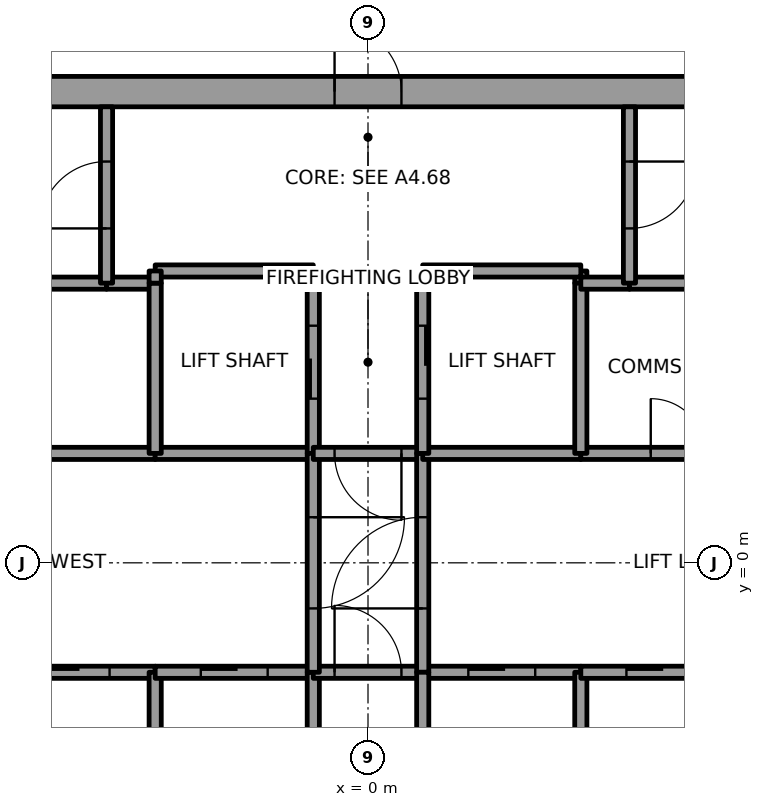
"""IFC4 building model, lengths in metres.
Left out: names, types, materials, properties, quantities, classifications, styles, units other than length and angle.
Written with IfcOpenShell. Run it as: python <this file> out.ifc"""

import sys

from ifc_helpers import new_model, si_unit, direction, frame, frame_2d, origin, place, context, subcontext, project, spatial, rectangle, extrude, element, fill, save


model = new_model("IFC4")
c1 = context("Model", 3, precision=1e-05, world=origin(), true_north=direction((0.0, 1.0)))
c2 = subcontext(c1, "Body", "Model", "MODEL_VIEW")
j1 = project(units=[si_unit("LENGTHUNIT", "METRE"), si_unit("PLANEANGLEUNIT", "RADIAN")], contexts=[c1])
p1 = place(None, origin())
s1 = spatial("IfcSite", under=j1, at=p1, CompositionType="ELEMENT")
p2 = place(p1, origin())
s2 = spatial("IfcBuilding", under=s1, at=p2, CompositionType="ELEMENT")
p3 = place(p2, frame((0.0, 0.0, 291.0)))
s3 = spatial("IfcBuildingStorey", under=s2, at=p3, CompositionType="ELEMENT", Elevation=291.0)
p4 = place(p3, frame((-11.0, 7.75, 0.0), z_axis=(0.0, 0.0, 1.0), x_axis=(1.0, 0.0, 0.0)))
e1 = element("IfcWall", 1, at=p4, inside=s3, PredefinedType="SHEAR", context=c2, shape_type="SweptSolid", body=[
    extrude(rectangle(XDim=22.0, YDim=0.5, at=frame_2d((11.0, 0.0))), origin(), (0.0, 0.0, 1.0), 4.0),
])
p5 = place(p4, frame((10.45, 0.0, 0.0)))
e2 = element("IfcOpeningElement", 2, at=p5, cuts=e1, PredefinedType="OPENING", context=c2, shape_type="SweptSolid", body=[
    extrude(rectangle(XDim=1.1, YDim=2.1, at=frame_2d((0.55, 1.05))), frame((0.0, 0.25, 0.0), z_axis=(0.0, -1.0, 0.0), x_axis=(1.0, 0.0, 0.0)), (0.0, 0.0, 1.0), 0.5),
])
p6 = place(p3, frame((-8.7, 1.8, 0.0), z_axis=(0.0, 0.0, 1.0), x_axis=(1.0, 0.0, 0.0)))
e3 = element("IfcWall", 3, at=p6, inside=s3, PredefinedType="SOLIDWALL", context=c2, shape_type="SweptSolid", body=[
    extrude(rectangle(XDim=5.2, YDim=0.2, at=frame_2d((2.6, 0.0))), origin(), (0.0, 0.0, 1.0), 3.85),
])
p7 = place(p6, frame((2.15, 0.0, 0.0)))
e4 = element("IfcOpeningElement", 4, at=p7, cuts=e3, PredefinedType="OPENING", context=c2, shape_type="SweptSolid", body=[
    extrude(rectangle(XDim=0.9, YDim=2.1, at=frame_2d((0.45, 1.05))), frame((0.0, 0.1, 0.0), z_axis=(0.0, -1.0, 0.0), x_axis=(1.0, 0.0, 0.0)), (0.0, 0.0, 1.0), 0.2),
])
p8 = place(p3, frame((-4.3, 4.6, 0.0), z_axis=(0.0, 0.0, 1.0), x_axis=(-1.0, 0.0, 0.0)))
e5 = element("IfcWall", 5, at=p8, inside=s3, PredefinedType="SOLIDWALL", context=c2, shape_type="SweptSolid", body=[
    extrude(rectangle(XDim=4.4, YDim=0.2, at=frame_2d((2.2, 0.0))), origin(), (0.0, 0.0, 1.0), 3.85),
])
p9 = place(p3, frame((-6.1, -1.8, 0.0), z_axis=(0.0, 0.0, 1.0), x_axis=(1.0, 0.0, 0.0)))
e6 = element("IfcWall", 6, at=p9, inside=s3, PredefinedType="SOLIDWALL", context=c2, shape_type="SweptSolid", body=[
    extrude(rectangle(XDim=2.6, YDim=0.2, at=frame_2d((1.3, 0.0))), origin(), (0.0, 0.0, 1.0), 3.85),
])
p10 = place(p9, frame((0.75, 0.0, 0.0)))
e7 = element("IfcOpeningElement", 7, at=p10, cuts=e6, PredefinedType="OPENING", context=c2, shape_type="SweptSolid", body=[
    extrude(rectangle(XDim=1.1, YDim=2.1, at=frame_2d((0.55, 1.05))), frame((0.0, 0.1, 0.0), z_axis=(0.0, -1.0, 0.0), x_axis=(1.0, 0.0, 0.0)), (0.0, 0.0, 1.0), 0.2),
])
p11 = place(p3, frame((-3.5, 4.6, 0.0), z_axis=(0.0, 0.0, 1.0), x_axis=(-1.0, 0.0, 0.0)))
e8 = element("IfcWall", 8, at=p11, inside=s3, PredefinedType="SOLIDWALL", context=c2, shape_type="SweptSolid", body=[
    extrude(rectangle(XDim=0.8, YDim=0.2, at=frame_2d((0.4, 0.0))), origin(), (0.0, 0.0, 1.0), 3.85),
])
p12 = place(p3, frame((-4.3, 4.6, 0.0), z_axis=(0.0, 0.0, 1.0), x_axis=(0.0, 1.0, 0.0)))
e9 = element("IfcWall", 9, at=p12, inside=s3, PredefinedType="SOLIDWALL", context=c2, shape_type="SweptSolid", body=[
    extrude(rectangle(XDim=2.9, YDim=0.2, at=frame_2d((1.45, 0.0))), origin(), (0.0, 0.0, 1.0), 3.85),
])
p13 = place(p12, frame((0.9, 0.0, 0.0)))
e10 = element("IfcOpeningElement", 10, at=p13, cuts=e9, PredefinedType="OPENING", context=c2, shape_type="SweptSolid", body=[
    extrude(rectangle(XDim=1.1, YDim=2.1, at=frame_2d((0.55, 1.05))), frame((0.0, 0.1, 0.0), z_axis=(0.0, -1.0, 0.0), x_axis=(1.0, 0.0, 0.0)), (0.0, 0.0, 1.0), 0.2),
])
p14 = place(p3, frame((-3.5, -4.6, 0.0), z_axis=(0.0, 0.0, 1.0), x_axis=(0.0, 1.0, 0.0)))
e11 = element("IfcWall", 11, at=p14, inside=s3, PredefinedType="SOLIDWALL", context=c2, shape_type="SweptSolid", body=[
    extrude(rectangle(XDim=2.8, YDim=0.2, at=frame_2d((1.4, 0.0))), origin(), (0.0, 0.0, 1.0), 3.85),
])
p15 = place(p3, frame((-3.5, -1.8, 0.0), z_axis=(0.0, 0.0, 1.0), x_axis=(1.0, 0.0, 0.0)))
e12 = element("IfcWall", 12, at=p15, inside=s3, PredefinedType="SOLIDWALL", context=c2, shape_type="SweptSolid", body=[
    extrude(rectangle(XDim=2.6, YDim=0.2, at=frame_2d((1.3, 0.0))), origin(), (0.0, 0.0, 1.0), 3.85),
])
p16 = place(p15, frame((0.75, 0.0, 0.0)))
e13 = element("IfcOpeningElement", 13, at=p16, cuts=e12, PredefinedType="OPENING", context=c2, shape_type="SweptSolid", body=[
    extrude(rectangle(XDim=1.1, YDim=2.1, at=frame_2d((0.55, 1.05))), frame((0.0, 0.1, 0.0), z_axis=(0.0, -1.0, 0.0), x_axis=(1.0, 0.0, 0.0)), (0.0, 0.0, 1.0), 0.2),
])
p17 = place(p3, frame((-0.9, 1.8, 0.0), z_axis=(0.0, 0.0, 1.0), x_axis=(-1.0, 0.0, 0.0)))
e14 = element("IfcWall", 14, at=p17, inside=s3, PredefinedType="SOLIDWALL", context=c2, shape_type="SweptSolid", body=[
    extrude(rectangle(XDim=2.6, YDim=0.2, at=frame_2d((1.3, 0.0))), origin(), (0.0, 0.0, 1.0), 3.85),
])
p18 = place(p3, frame((-3.5, 1.8, 0.0), z_axis=(0.0, 0.0, 1.0), x_axis=(0.0, 1.0, 0.0)))
e15 = element("IfcWall", 15, at=p18, inside=s3, PredefinedType="SOLIDWALL", context=c2, shape_type="SweptSolid", body=[
    extrude(rectangle(XDim=2.8, YDim=0.2, at=frame_2d((1.4, 0.0))), origin(), (0.0, 0.0, 1.0), 3.85),
])
p19 = place(p3, frame((-0.9, 1.8, 0.0), z_axis=(0.0, 0.0, 1.0), x_axis=(0.0, 1.0, 0.0)))
e16 = element("IfcWall", 16, at=p19, inside=s3, PredefinedType="SOLIDWALL", context=c2, shape_type="SweptSolid", body=[
    extrude(rectangle(XDim=3.0, YDim=0.2, at=frame_2d((1.5, 0.0))), origin(), (0.0, 0.0, 1.0), 3.85),
])
p20 = place(p19, frame((0.9, 0.0, 0.0)))
e17 = element("IfcOpeningElement", 17, at=p20, cuts=e16, PredefinedType="OPENING", context=c2, shape_type="SweptSolid", body=[
    extrude(rectangle(XDim=1.2, YDim=2.1, at=frame_2d((0.6, 1.05))), frame((0.0, 0.1, 0.0), z_axis=(0.0, -1.0, 0.0), x_axis=(1.0, 0.0, 0.0)), (0.0, 0.0, 1.0), 0.2),
])
p21 = place(p3, frame((-0.9, 4.8, 0.0), z_axis=(0.0, 0.0, 1.0), x_axis=(-1.0, 0.0, 0.0)))
e18 = element("IfcWall", 18, at=p21, inside=s3, PredefinedType="SOLIDWALL", context=c2, shape_type="SweptSolid", body=[
    extrude(rectangle(XDim=2.6, YDim=0.2, at=frame_2d((1.3, 0.0))), origin(), (0.0, 0.0, 1.0), 3.85),
])
p22 = place(p3, frame((-3.5, 4.8, 0.0), z_axis=(0.0, 0.0, 1.0), x_axis=(0.0, -1.0, 0.0)))
e19 = element("IfcWall", 19, at=p22, inside=s3, PredefinedType="SOLIDWALL", context=c2, shape_type="SweptSolid", body=[
    extrude(rectangle(XDim=0.2, YDim=0.2, at=frame_2d((0.1, 0.0))), origin(), (0.0, 0.0, 1.0), 3.85),
])
p23 = place(p3, frame((-0.9, -4.6, 0.0), z_axis=(0.0, 0.0, 1.0), x_axis=(0.0, 1.0, 0.0)))
e20 = element("IfcWall", 20, at=p23, inside=s3, PredefinedType="SOLIDWALL", context=c2, shape_type="SweptSolid", body=[
    extrude(rectangle(XDim=2.8, YDim=0.2, at=frame_2d((1.4, 0.0))), origin(), (0.0, 0.0, 1.0), 3.85),
])
p24 = place(p3, frame((-0.9, -1.8, 0.0), z_axis=(0.0, 0.0, 1.0), x_axis=(1.0, 0.0, 0.0)))
e21 = element("IfcWall", 21, at=p24, inside=s3, PredefinedType="SOLIDWALL", context=c2, shape_type="SweptSolid", body=[
    extrude(rectangle(XDim=1.8, YDim=0.2, at=frame_2d((0.9, 0.0))), origin(), (0.0, 0.0, 1.0), 3.85),
])
p25 = place(p24, frame((0.35, 0.0, 0.0)))
e22 = element("IfcOpeningElement", 22, at=p25, cuts=e21, PredefinedType="OPENING", context=c2, shape_type="SweptSolid", body=[
    extrude(rectangle(XDim=1.1, YDim=2.1, at=frame_2d((0.55, 1.05))), frame((0.0, 0.1, 0.0), z_axis=(0.0, -1.0, 0.0), x_axis=(1.0, 0.0, 0.0)), (0.0, 0.0, 1.0), 0.2),
])
p26 = place(p3, frame((-0.9, 1.8, 0.0), z_axis=(0.0, 0.0, 1.0), x_axis=(0.0, -1.0, 0.0)))
e23 = element("IfcWall", 23, at=p26, inside=s3, PredefinedType="SOLIDWALL", context=c2, shape_type="SweptSolid", body=[
    extrude(rectangle(XDim=3.6, YDim=0.2, at=frame_2d((1.8, 0.0))), origin(), (0.0, 0.0, 1.0), 3.85),
])
p27 = place(p26, frame((1.05, 0.0, 0.0)))
e24 = element("IfcOpeningElement", 24, at=p27, cuts=e23, PredefinedType="OPENING", context=c2, shape_type="SweptSolid", body=[
    extrude(rectangle(XDim=1.5, YDim=2.1, at=frame_2d((0.75, 1.05))), frame((0.0, 0.1, 0.0), z_axis=(0.0, -1.0, 0.0), x_axis=(1.0, 0.0, 0.0)), (0.0, 0.0, 1.0), 0.2),
])
p28 = place(p3, frame((0.9, 1.8, 0.0), z_axis=(0.0, 0.0, 1.0), x_axis=(-1.0, 0.0, 0.0)))
e25 = element("IfcWall", 25, at=p28, inside=s3, PredefinedType="SOLIDWALL", context=c2, shape_type="SweptSolid", body=[
    extrude(rectangle(XDim=1.8, YDim=0.2, at=frame_2d((0.9, 0.0))), origin(), (0.0, 0.0, 1.0), 3.85),
])
p29 = place(p28, frame((0.35, 0.0, 0.0)))
e26 = element("IfcOpeningElement", 26, at=p29, cuts=e25, PredefinedType="OPENING", context=c2, shape_type="SweptSolid", body=[
    extrude(rectangle(XDim=1.1, YDim=2.1, at=frame_2d((0.55, 1.05))), frame((0.0, 0.1, 0.0), z_axis=(0.0, -1.0, 0.0), x_axis=(1.0, 0.0, 0.0)), (0.0, 0.0, 1.0), 0.2),
])
p30 = place(p3, frame((0.9, -1.8, 0.0), z_axis=(0.0, 0.0, 1.0), x_axis=(1.0, 0.0, 0.0)))
e27 = element("IfcWall", 27, at=p30, inside=s3, PredefinedType="SOLIDWALL", context=c2, shape_type="SweptSolid", body=[
    extrude(rectangle(XDim=2.6, YDim=0.2, at=frame_2d((1.3, 0.0))), origin(), (0.0, 0.0, 1.0), 3.85),
])
p31 = place(p30, frame((0.75, 0.0, 0.0)))
e28 = element("IfcOpeningElement", 28, at=p31, cuts=e27, PredefinedType="OPENING", context=c2, shape_type="SweptSolid", body=[
    extrude(rectangle(XDim=1.1, YDim=2.1, at=frame_2d((0.55, 1.05))), frame((0.0, 0.1, 0.0), z_axis=(0.0, -1.0, 0.0), x_axis=(1.0, 0.0, 0.0)), (0.0, 0.0, 1.0), 0.2),
])
p32 = place(p3, frame((0.9, -1.8, 0.0), z_axis=(0.0, 0.0, 1.0), x_axis=(0.0, 1.0, 0.0)))
e29 = element("IfcWall", 29, at=p32, inside=s3, PredefinedType="SOLIDWALL", context=c2, shape_type="SweptSolid", body=[
    extrude(rectangle(XDim=3.6, YDim=0.2, at=frame_2d((1.8, 0.0))), origin(), (0.0, 0.0, 1.0), 3.85),
])
p33 = place(p32, frame((1.05, 0.0, 0.0)))
e30 = element("IfcOpeningElement", 30, at=p33, cuts=e29, PredefinedType="OPENING", context=c2, shape_type="SweptSolid", body=[
    extrude(rectangle(XDim=1.5, YDim=2.1, at=frame_2d((0.75, 1.05))), frame((0.0, 0.1, 0.0), z_axis=(0.0, -1.0, 0.0), x_axis=(1.0, 0.0, 0.0)), (0.0, 0.0, 1.0), 0.2),
])
p34 = place(p3, frame((0.9, -1.8, 0.0), z_axis=(0.0, 0.0, 1.0), x_axis=(0.0, -1.0, 0.0)))
e31 = element("IfcWall", 31, at=p34, inside=s3, PredefinedType="SOLIDWALL", context=c2, shape_type="SweptSolid", body=[
    extrude(rectangle(XDim=2.8, YDim=0.2, at=frame_2d((1.4, 0.0))), origin(), (0.0, 0.0, 1.0), 3.85),
])
p35 = place(p3, frame((3.5, 1.8, 0.0), z_axis=(0.0, 0.0, 1.0), x_axis=(-1.0, 0.0, 0.0)))
e32 = element("IfcWall", 32, at=p35, inside=s3, PredefinedType="SOLIDWALL", context=c2, shape_type="SweptSolid", body=[
    extrude(rectangle(XDim=2.6, YDim=0.2, at=frame_2d((1.3, 0.0))), origin(), (0.0, 0.0, 1.0), 3.85),
])
p36 = place(p3, frame((3.5, 4.6, 0.0), z_axis=(0.0, 0.0, 1.0), x_axis=(0.0, 1.0, 0.0)))
e33 = element("IfcWall", 33, at=p36, inside=s3, PredefinedType="SOLIDWALL", context=c2, shape_type="SweptSolid", body=[
    extrude(rectangle(XDim=0.2, YDim=0.2, at=frame_2d((0.1, 0.0))), origin(), (0.0, 0.0, 1.0), 3.85),
])
p37 = place(p3, frame((3.5, 4.8, 0.0), z_axis=(0.0, 0.0, 1.0), x_axis=(-1.0, 0.0, 0.0)))
e34 = element("IfcWall", 34, at=p37, inside=s3, PredefinedType="SOLIDWALL", context=c2, shape_type="SweptSolid", body=[
    extrude(rectangle(XDim=2.6, YDim=0.2, at=frame_2d((1.3, 0.0))), origin(), (0.0, 0.0, 1.0), 3.85),
])
p38 = place(p3, frame((0.9, 4.8, 0.0), z_axis=(0.0, 0.0, 1.0), x_axis=(0.0, -1.0, 0.0)))
e35 = element("IfcWall", 35, at=p38, inside=s3, PredefinedType="SOLIDWALL", context=c2, shape_type="SweptSolid", body=[
    extrude(rectangle(XDim=3.0, YDim=0.2, at=frame_2d((1.5, 0.0))), origin(), (0.0, 0.0, 1.0), 3.85),
])
p39 = place(p38, frame((0.9, 0.0, 0.0)))
e36 = element("IfcOpeningElement", 36, at=p39, cuts=e35, PredefinedType="OPENING", context=c2, shape_type="SweptSolid", body=[
    extrude(rectangle(XDim=1.2, YDim=2.1, at=frame_2d((0.6, 1.05))), frame((0.0, 0.1, 0.0), z_axis=(0.0, -1.0, 0.0), x_axis=(1.0, 0.0, 0.0)), (0.0, 0.0, 1.0), 0.2),
])
p40 = place(p3, frame((3.5, -4.6, 0.0), z_axis=(0.0, 0.0, 1.0), x_axis=(0.0, 1.0, 0.0)))
e37 = element("IfcWall", 37, at=p40, inside=s3, PredefinedType="SOLIDWALL", context=c2, shape_type="SweptSolid", body=[
    extrude(rectangle(XDim=2.8, YDim=0.2, at=frame_2d((1.4, 0.0))), origin(), (0.0, 0.0, 1.0), 3.85),
])
p41 = place(p3, frame((3.5, -1.8, 0.0), z_axis=(0.0, 0.0, 1.0), x_axis=(1.0, 0.0, 0.0)))
e38 = element("IfcWall", 38, at=p41, inside=s3, PredefinedType="SOLIDWALL", context=c2, shape_type="SweptSolid", body=[
    extrude(rectangle(XDim=2.6, YDim=0.2, at=frame_2d((1.3, 0.0))), origin(), (0.0, 0.0, 1.0), 3.85),
])
p42 = place(p41, frame((0.75, 0.0, 0.0)))
e39 = element("IfcOpeningElement", 39, at=p42, cuts=e38, PredefinedType="OPENING", context=c2, shape_type="SweptSolid", body=[
    extrude(rectangle(XDim=1.1, YDim=2.1, at=frame_2d((0.55, 1.05))), frame((0.0, 0.1, 0.0), z_axis=(0.0, -1.0, 0.0), x_axis=(1.0, 0.0, 0.0)), (0.0, 0.0, 1.0), 0.2),
])
p43 = place(p3, frame((3.5, 1.8, 0.0), z_axis=(0.0, 0.0, 1.0), x_axis=(1.0, 0.0, 0.0)))
e40 = element("IfcWall", 40, at=p43, inside=s3, PredefinedType="SOLIDWALL", context=c2, shape_type="SweptSolid", body=[
    extrude(rectangle(XDim=3.2, YDim=0.2, at=frame_2d((1.6, 0.0))), origin(), (0.0, 0.0, 1.0), 3.85),
])
p44 = place(p43, frame((1.15, 0.0, 0.0)))
e41 = element("IfcOpeningElement", 41, at=p44, cuts=e40, PredefinedType="OPENING", context=c2, shape_type="SweptSolid", body=[
    extrude(rectangle(XDim=0.9, YDim=2.1, at=frame_2d((0.45, 1.05))), frame((0.0, 0.1, 0.0), z_axis=(0.0, -1.0, 0.0), x_axis=(1.0, 0.0, 0.0)), (0.0, 0.0, 1.0), 0.2),
])
p45 = place(p3, frame((3.5, 4.6, 0.0), z_axis=(0.0, 0.0, 1.0), x_axis=(0.0, -1.0, 0.0)))
e42 = element("IfcWall", 42, at=p45, inside=s3, PredefinedType="SOLIDWALL", context=c2, shape_type="SweptSolid", body=[
    extrude(rectangle(XDim=2.8, YDim=0.2, at=frame_2d((1.4, 0.0))), origin(), (0.0, 0.0, 1.0), 3.85),
])
p46 = place(p3, frame((4.3, 4.6, 0.0), z_axis=(0.0, 0.0, 1.0), x_axis=(-1.0, 0.0, 0.0)))
e43 = element("IfcWall", 43, at=p46, inside=s3, PredefinedType="SOLIDWALL", context=c2, shape_type="SweptSolid", body=[
    extrude(rectangle(XDim=0.8, YDim=0.2, at=frame_2d((0.4, 0.0))), origin(), (0.0, 0.0, 1.0), 3.85),
])
p47 = place(p3, frame((6.7, 4.6, 0.0), z_axis=(0.0, 0.0, 1.0), x_axis=(-1.0, 0.0, 0.0)))
e44 = element("IfcWall", 44, at=p47, inside=s3, PredefinedType="SOLIDWALL", context=c2, shape_type="SweptSolid", body=[
    extrude(rectangle(XDim=2.4, YDim=0.2, at=frame_2d((1.2, 0.0))), origin(), (0.0, 0.0, 1.0), 3.85),
])
p48 = place(p3, frame((4.3, 7.5, 0.0), z_axis=(0.0, 0.0, 1.0), x_axis=(0.0, -1.0, 0.0)))
e45 = element("IfcWall", 45, at=p48, inside=s3, PredefinedType="SOLIDWALL", context=c2, shape_type="SweptSolid", body=[
    extrude(rectangle(XDim=2.9, YDim=0.2, at=frame_2d((1.45, 0.0))), origin(), (0.0, 0.0, 1.0), 3.85),
])
p49 = place(p48, frame((0.9, 0.0, 0.0)))
e46 = element("IfcOpeningElement", 46, at=p49, cuts=e45, PredefinedType="OPENING", context=c2, shape_type="SweptSolid", body=[
    extrude(rectangle(XDim=1.1, YDim=2.1, at=frame_2d((0.55, 1.05))), frame((0.0, 0.1, 0.0), z_axis=(0.0, -1.0, 0.0), x_axis=(1.0, 0.0, 0.0)), (0.0, 0.0, 1.0), 0.2),
])
p50 = place(p10, origin())
e47 = element("IfcDoor", 47, at=p50, inside=s3, OperationType="SLIDING_TO_RIGHT", PredefinedType="DOOR", context=c2, shape_type="SweptSolid", body=[
    extrude(rectangle(XDim=1.1, YDim=2.1, at=frame_2d((0.55, 1.05))), frame((0.0, 0.025, 0.0), z_axis=(0.0, -1.0, 0.0), x_axis=(1.0, 0.0, 0.0)), (0.0, 0.0, 1.0), 0.05),
])
fill(e7, e47)
p51 = place(p16, origin())
e48 = element("IfcDoor", 48, at=p51, inside=s3, OperationType="SLIDING_TO_RIGHT", PredefinedType="DOOR", context=c2, shape_type="SweptSolid", body=[
    extrude(rectangle(XDim=1.1, YDim=2.1, at=frame_2d((0.55, 1.05))), frame((0.0, 0.025, 0.0), z_axis=(0.0, -1.0, 0.0), x_axis=(1.0, 0.0, 0.0)), (0.0, 0.0, 1.0), 0.05),
])
fill(e13, e48)
p52 = place(p31, origin())
e49 = element("IfcDoor", 49, at=p52, inside=s3, OperationType="SLIDING_TO_LEFT", PredefinedType="DOOR", context=c2, shape_type="SweptSolid", body=[
    extrude(rectangle(XDim=1.1, YDim=2.1, at=frame_2d((0.55, 1.05))), frame((0.0, 0.025, 0.0), z_axis=(0.0, -1.0, 0.0), x_axis=(1.0, 0.0, 0.0)), (0.0, 0.0, 1.0), 0.05),
])
fill(e28, e49)
p53 = place(p42, origin())
e50 = element("IfcDoor", 50, at=p53, inside=s3, OperationType="SLIDING_TO_LEFT", PredefinedType="DOOR", context=c2, shape_type="SweptSolid", body=[
    extrude(rectangle(XDim=1.1, YDim=2.1, at=frame_2d((0.55, 1.05))), frame((0.0, 0.025, 0.0), z_axis=(0.0, -1.0, 0.0), x_axis=(1.0, 0.0, 0.0)), (0.0, 0.0, 1.0), 0.05),
])
fill(e39, e50)
p54 = place(p20, origin())
e51 = element("IfcDoor", 51, at=p54, inside=s3, OperationType="SLIDING_TO_RIGHT", PredefinedType="DOOR", context=c2, shape_type="SweptSolid", body=[
    extrude(rectangle(XDim=1.2, YDim=2.1, at=frame_2d((0.6, 1.05))), frame((0.0, 0.025, 0.0), z_axis=(0.0, -1.0, 0.0), x_axis=(1.0, 0.0, 0.0)), (0.0, 0.0, 1.0), 0.05),
])
fill(e17, e51)
p55 = place(p39, origin())
e52 = element("IfcDoor", 52, at=p55, inside=s3, OperationType="SLIDING_TO_LEFT", PredefinedType="DOOR", context=c2, shape_type="SweptSolid", body=[
    extrude(rectangle(XDim=1.2, YDim=2.1, at=frame_2d((0.6, 1.05))), frame((0.0, 0.025, 0.0), z_axis=(0.0, -1.0, 0.0), x_axis=(1.0, 0.0, 0.0)), (0.0, 0.0, 1.0), 0.05),
])
fill(e36, e52)
p56 = place(p27, origin())
e53 = element("IfcDoor", 53, at=p56, inside=s3, OperationType="DOUBLE_DOOR_SINGLE_SWING", PredefinedType="DOOR", context=c2, shape_type="SweptSolid", body=[
    extrude(rectangle(XDim=1.5, YDim=2.1, at=frame_2d((0.75, 1.05))), frame((0.0, 0.025, 0.0), z_axis=(0.0, -1.0, 0.0), x_axis=(1.0, 0.0, 0.0)), (0.0, 0.0, 1.0), 0.05),
])
fill(e24, e53)
p57 = place(p33, origin())
e54 = element("IfcDoor", 54, at=p57, inside=s3, OperationType="DOUBLE_DOOR_SINGLE_SWING", PredefinedType="DOOR", context=c2, shape_type="SweptSolid", body=[
    extrude(rectangle(XDim=1.5, YDim=2.1, at=frame_2d((0.75, 1.05))), frame((0.0, 0.025, 0.0), z_axis=(0.0, -1.0, 0.0), x_axis=(1.0, 0.0, 0.0)), (0.0, 0.0, 1.0), 0.05),
])
fill(e30, e54)
p58 = place(p29, origin())
e55 = element("IfcDoor", 55, at=p58, inside=s3, OperationType="SINGLE_SWING_LEFT", PredefinedType="DOOR", context=c2, shape_type="SweptSolid", body=[
    extrude(rectangle(XDim=1.1, YDim=2.1, at=frame_2d((0.55, 1.05))), frame((0.0, 0.025, 0.0), z_axis=(0.0, -1.0, 0.0), x_axis=(1.0, 0.0, 0.0)), (0.0, 0.0, 1.0), 0.05),
])
fill(e26, e55)
p59 = place(p25, origin())
e56 = element("IfcDoor", 56, at=p59, inside=s3, OperationType="SINGLE_SWING_RIGHT", PredefinedType="DOOR", context=c2, shape_type="SweptSolid", body=[
    extrude(rectangle(XDim=1.1, YDim=2.1, at=frame_2d((0.55, 1.05))), frame((0.0, 0.025, 0.0), z_axis=(0.0, -1.0, 0.0), x_axis=(1.0, 0.0, 0.0)), (0.0, 0.0, 1.0), 0.05),
])
fill(e22, e56)
p60 = place(p13, origin())
e57 = element("IfcDoor", 57, at=p60, inside=s3, OperationType="SINGLE_SWING_LEFT", PredefinedType="DOOR", context=c2, shape_type="SweptSolid", body=[
    extrude(rectangle(XDim=1.1, YDim=2.1, at=frame_2d((0.55, 1.05))), frame((0.0, 0.025, 0.0), z_axis=(0.0, -1.0, 0.0), x_axis=(1.0, 0.0, 0.0)), (0.0, 0.0, 1.0), 0.05),
])
fill(e10, e57)
p61 = place(p49, origin())
e58 = element("IfcDoor", 58, at=p61, inside=s3, OperationType="SINGLE_SWING_LEFT", PredefinedType="DOOR", context=c2, shape_type="SweptSolid", body=[
    extrude(rectangle(XDim=1.1, YDim=2.1, at=frame_2d((0.55, 1.05))), frame((0.0, 0.025, 0.0), z_axis=(0.0, -1.0, 0.0), x_axis=(1.0, 0.0, 0.0)), (0.0, 0.0, 1.0), 0.05),
])
fill(e46, e58)
p62 = place(p44, origin())
e59 = element("IfcDoor", 59, at=p62, inside=s3, OperationType="SINGLE_SWING_LEFT", PredefinedType="DOOR", context=c2, shape_type="SweptSolid", body=[
    extrude(rectangle(XDim=0.9, YDim=2.1, at=frame_2d((0.45, 1.05))), frame((0.0, 0.025, 0.0), z_axis=(0.0, -1.0, 0.0), x_axis=(1.0, 0.0, 0.0)), (0.0, 0.0, 1.0), 0.05),
])
fill(e41, e59)
p63 = place(p5, origin())
e60 = element("IfcDoor", 60, at=p63, inside=s3, OperationType="SINGLE_SWING_RIGHT", PredefinedType="DOOR", context=c2, shape_type="SweptSolid", body=[
    extrude(rectangle(XDim=1.1, YDim=2.1, at=frame_2d((0.55, 1.05))), frame((0.0, 0.025, 0.0), z_axis=(0.0, -1.0, 0.0), x_axis=(1.0, 0.0, 0.0)), (0.0, 0.0, 1.0), 0.05),
])
fill(e2, e60)
save(model, sys.argv[1])
